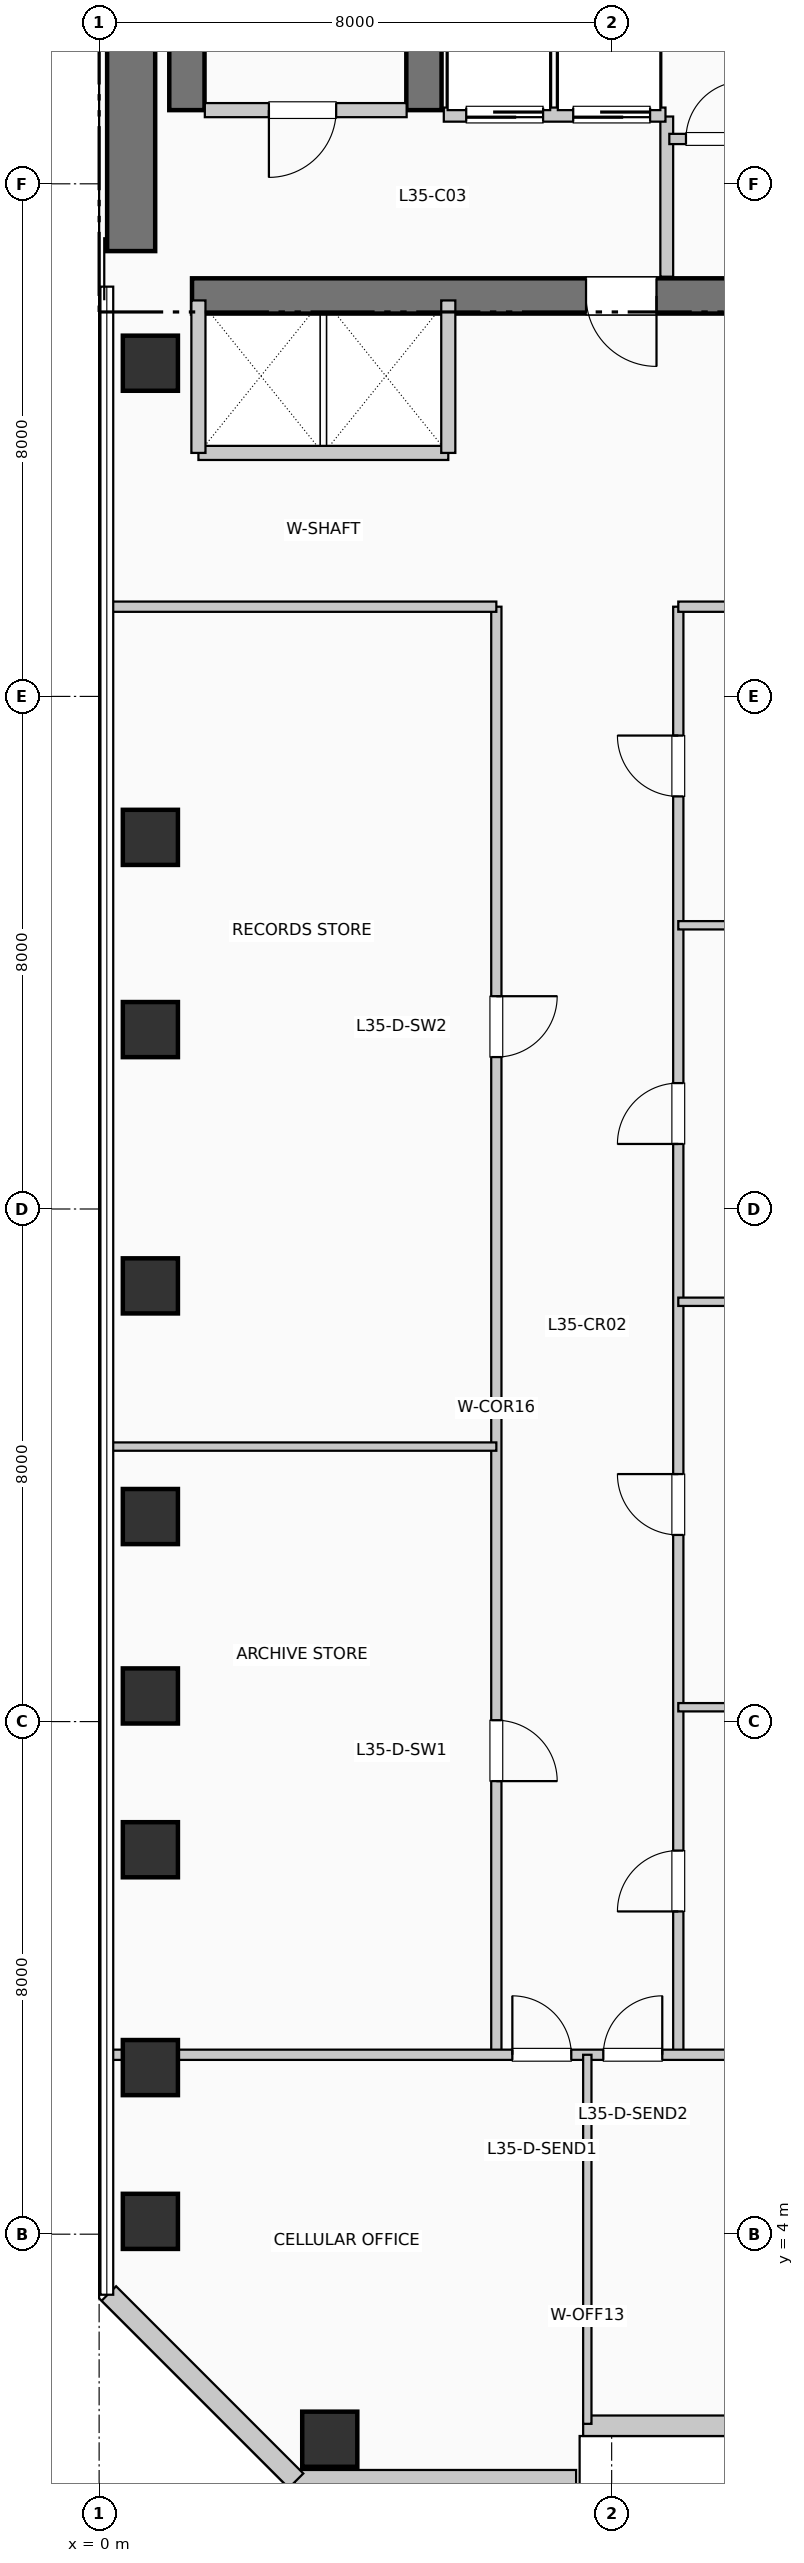
"""IFC4 building model, lengths in metres.
Left out: names, types, materials, properties, quantities, classifications, styles, units other than length and angle.
Written with IfcOpenShell. Run it as: python <this file> out.ifc"""

import sys

from ifc_helpers import new_model, si_unit, direction, frame, frame_2d, origin, origin_2d, place, context, subcontext, project, spatial, rectangle, extrude, element, fill, save


model = new_model("IFC4")
c1 = context("Model", 3, precision=1e-05, world=origin(), true_north=direction((0.0, 1.0)))
c2 = subcontext(c1, "Body", "Model", "MODEL_VIEW")
j1 = project(units=[si_unit("LENGTHUNIT", "METRE"), si_unit("PLANEANGLEUNIT", "RADIAN")], contexts=[c1])
p1 = place(None, origin())
s1 = spatial("IfcSite", under=j1, at=p1, CompositionType="ELEMENT")
p2 = place(p1, origin())
s2 = spatial("IfcBuilding", under=s1, at=p2, CompositionType="ELEMENT")
p3 = place(p2, frame((0.0, 0.0, 146.85)))
s3 = spatial("IfcBuildingStorey", under=s2, at=p3, CompositionType="ELEMENT", Elevation=146.85)
p4 = place(p3, frame((0.5, 34.95, 0.0), z_axis=(0.0, 0.0, 1.0), x_axis=(0.0, 1.0, 0.0)))
e1 = element("IfcWall", 1, at=p4, inside=s3, PredefinedType="SHEAR", context=c2, shape_type="SweptSolid", body=[
    extrude(rectangle(XDim=7.9, YDim=0.75, at=frame_2d((3.95, 0.0))), origin(), (0.0, 0.0, 1.0), 3.96),
])
p5 = place(p3, frame((1.45, 34.25, 0.0), z_axis=(0.0, 0.0, 1.0), x_axis=(1.0, 0.0, 0.0)))
e2 = element("IfcWall", 2, at=p5, inside=s3, PredefinedType="SHEAR", context=c2, shape_type="SweptSolid", body=[
    extrude(rectangle(XDim=10.71, YDim=0.55, at=frame_2d((5.355, 0.0))), origin(), (0.0, 0.0, 1.0), 3.96),
])
p6 = place(p5, frame((7.25, 0.0, 0.0), z_axis=(0.0, 0.0, 1.0), x_axis=(-1.0, 0.0, 0.0)))
e3 = element("IfcOpeningElement", 3, at=p6, cuts=e2, PredefinedType="OPENING", context=c2, shape_type="SweptSolid", body=[
    extrude(rectangle(XDim=1.1, YDim=2.15, at=frame_2d((0.55, 1.075))), frame((0.0, 0.285, 0.0), z_axis=(0.0, -1.0, 0.0), x_axis=(1.0, 0.0, 0.0)), (0.0, 0.0, 1.0), 0.57),
])
for number, where, z_axis, x_axis in (
    (4, (1.37, 37.15, 0.0), (0.0, 0.0, 1.0), (0.0, 1.0, 0.0)),
    (5, (5.07, 37.15, 0.0), (0.0, 0.0, 1.0), (0.0, 1.0, 0.0)),
):
    element("IfcWall", number, at=place(p3, frame(where, z_axis=z_axis, x_axis=x_axis)), inside=s3, PredefinedType="SHEAR", context=c2, shape_type="SweptSolid", body=[
        extrude(rectangle(XDim=7.89, YDim=0.55, at=frame_2d((3.945, 0.0))), origin(), (0.0, 0.0, 1.0), 3.96),
    ])
for number, where, z_axis, x_axis in (
    (6, (0.8, 4.2, 0.0), (0.0, 0.0, 1.0), (1.0, 0.0, 0.0)),
    (7, (0.8, 6.6, 0.0), (0.0, 0.0, 1.0), (1.0, 0.0, 0.0)),
    (8, (0.8, 10.0, 0.0), (0.0, 0.0, 1.0), (1.0, 0.0, 0.0)),
    (9, (0.8, 12.4, 0.0), (0.0, 0.0, 1.0), (1.0, 0.0, 0.0)),
    (10, (0.8, 15.2, 0.0), (0.0, 0.0, 1.0), (1.0, 0.0, 0.0)),
    (11, (0.8, 18.8, 0.0), (0.0, 0.0, 1.0), (1.0, 0.0, 0.0)),
    (12, (0.8, 22.8, 0.0), (0.0, 0.0, 1.0), (1.0, 0.0, 0.0)),
    (13, (0.8, 25.8, 0.0), (0.0, 0.0, 1.0), (1.0, 0.0, 0.0)),
    (14, (0.8, 33.2, 0.0), (0.0, 0.0, 1.0), (1.0, 0.0, 0.0)),
    (15, (3.6, 0.8, 0.0), (0.0, 0.0, 1.0), (1.0, 0.0, 0.0)),
):
    element("IfcColumn", number, at=place(p3, frame(where, z_axis=z_axis, x_axis=x_axis)), inside=s3, PredefinedType="COLUMN", context=c2, shape_type="SweptSolid", body=[
        extrude(rectangle(XDim=0.86, YDim=0.86, at=origin_2d()), origin(), (0.0, 0.0, 1.0), 3.96),
    ])
p7 = place(p3, frame((3.055, 0.16, 0.0), z_axis=(0.0, 0.0, 1.0), x_axis=(1.0, 0.0, 0.0)))
e16 = element("IfcWall", 16, at=p7, inside=s3, PredefinedType="SOLIDWALL", context=c2, shape_type="SweptSolid", body=[
    extrude(rectangle(XDim=4.39, YDim=0.32, at=frame_2d((2.195, 0.0))), origin(), (0.0, 0.0, 1.0), 3.71),
])
p8 = place(p3, frame((7.555, 1.01, 0.0), z_axis=(0.0, 0.0, 1.0), x_axis=(1.0, 0.0, 0.0)))
e17 = element("IfcWall", 17, at=p8, inside=s3, PredefinedType="SOLIDWALL", context=c2, shape_type="SweptSolid", body=[
    extrude(rectangle(XDim=8.89, YDim=0.32, at=frame_2d((4.445, 0.0))), origin(), (0.0, 0.0, 1.0), 3.71),
])
p9 = place(p8, frame((3.245, 0.0, 0.85)))
e18 = element("IfcOpeningElement", 18, at=p9, cuts=e17, PredefinedType="OPENING", context=c2, shape_type="SweptSolid", body=[
    extrude(rectangle(XDim=2.4, YDim=2.05, at=frame_2d((1.2, 1.025))), frame((0.0, 0.17, 0.0), z_axis=(0.0, -1.0, 0.0), x_axis=(1.0, 0.0, 0.0)), (0.0, 0.0, 1.0), 0.34),
])
p10 = place(p3, frame((0.152, 3.074, 0.0), z_axis=(0.0, 0.0, 1.0), x_axis=(0.707106781187, -0.707106781187, 0.0)))
e19 = element("IfcWall", 19, at=p10, inside=s3, PredefinedType="SOLIDWALL", context=c2, shape_type="SweptSolid", body=[
    extrude(rectangle(XDim=4.133, YDim=0.32, at=frame_2d((2.066, 0.0))), origin(), (0.0, 0.0, 1.0), 3.71),
])
p11 = place(p3, frame((1.65, 37.15, 0.0), z_axis=(0.0, 0.0, 1.0), x_axis=(1.0, 0.0, 0.0)))
e20 = element("IfcWall", 20, at=p11, inside=s3, PredefinedType="PARTITIONING", context=c2, shape_type="SweptSolid", body=[
    extrude(rectangle(XDim=3.15, YDim=0.22, at=frame_2d((1.575, 0.0))), origin(), (0.0, 0.0, 1.0), 3.71),
])
p12 = place(p11, frame((2.05, 0.0, 0.0), z_axis=(0.0, 0.0, 1.0), x_axis=(-1.0, 0.0, 0.0)))
e21 = element("IfcOpeningElement", 21, at=p12, cuts=e20, PredefinedType="OPENING", context=c2, shape_type="SweptSolid", body=[
    extrude(rectangle(XDim=1.05, YDim=2.15, at=frame_2d((0.525, 1.075))), frame((0.0, 0.12, 0.0), z_axis=(0.0, -1.0, 0.0), x_axis=(1.0, 0.0, 0.0)), (0.0, 0.0, 1.0), 0.24),
])
p13 = place(p3, frame((8.86, 34.55, 0.0), z_axis=(0.0, 0.0, 1.0), x_axis=(0.0, 1.0, 0.0)))
e22 = element("IfcWall", 22, at=p13, inside=s3, PredefinedType="PARTITIONING", context=c2, shape_type="SweptSolid", body=[
    extrude(rectangle(XDim=2.5, YDim=0.2, at=frame_2d((1.25, 0.0))), origin(), (0.0, 0.0, 1.0), 3.71),
])
p14 = place(p3, frame((5.38, 37.08, 0.0), z_axis=(0.0, 0.0, 1.0), x_axis=(1.0, 0.0, 0.0)))
e23 = element("IfcWall", 23, at=p14, inside=s3, PredefinedType="PARTITIONING", context=c2, shape_type="SweptSolid", body=[
    extrude(rectangle(XDim=3.46, YDim=0.22, at=frame_2d((1.73, 0.0))), origin(), (0.0, 0.0, 1.0), 3.71),
])
p15 = place(p14, frame((1.55, 0.0, 0.0), z_axis=(0.0, 0.0, 1.0), x_axis=(-1.0, 0.0, 0.0)))
e24 = element("IfcOpeningElement", 24, at=p15, cuts=e23, PredefinedType="OPENING", context=c2, shape_type="SweptSolid", body=[
    extrude(rectangle(XDim=1.2, YDim=2.2, at=frame_2d((0.6, 1.1))), frame((0.0, 0.12, 0.0), z_axis=(0.0, -1.0, 0.0), x_axis=(1.0, 0.0, 0.0)), (0.0, 0.0, 1.0), 0.24),
])
p16 = place(p14, frame((3.22, 0.0, 0.0), z_axis=(0.0, 0.0, 1.0), x_axis=(-1.0, 0.0, 0.0)))
e25 = element("IfcOpeningElement", 25, at=p16, cuts=e23, PredefinedType="OPENING", context=c2, shape_type="SweptSolid", body=[
    extrude(rectangle(XDim=1.2, YDim=2.2, at=frame_2d((0.6, 1.1))), frame((0.0, 0.12, 0.0), z_axis=(0.0, -1.0, 0.0), x_axis=(1.0, 0.0, 0.0)), (0.0, 0.0, 1.0), 0.24),
])
p17 = place(p3, frame((1.55, 31.8, 0.0), z_axis=(0.0, 0.0, 1.0), x_axis=(1.0, 0.0, 0.0)))
e26 = element("IfcWall", 26, at=p17, inside=s3, PredefinedType="PARTITIONING", context=c2, shape_type="SweptSolid", body=[
    extrude(rectangle(XDim=3.9, YDim=0.22, at=frame_2d((1.95, 0.0))), origin(), (0.0, 0.0, 1.0), 3.71),
])
for number, where, z_axis, x_axis in (
    (27, (1.55, 31.8, 0.0), (0.0, 0.0, 1.0), (0.0, 1.0, 0.0)),
    (28, (5.45, 31.8, 0.0), (0.0, 0.0, 1.0), (0.0, 1.0, 0.0)),
):
    element("IfcWall", number, at=place(p3, frame(where, z_axis=z_axis, x_axis=x_axis)), inside=s3, PredefinedType="PARTITIONING", context=c2, shape_type="SweptSolid", body=[
        extrude(rectangle(XDim=2.38, YDim=0.22, at=frame_2d((1.19, 0.0))), origin(), (0.0, 0.0, 1.0), 3.71),
    ])
p18 = place(p3, frame((8.9, 36.7, 0.0), z_axis=(0.0, 0.0, 1.0), x_axis=(1.0, 0.0, 0.0)))
e29 = element("IfcWall", 29, at=p18, inside=s3, PredefinedType="PARTITIONING", context=c2, shape_type="SweptSolid", body=[
    extrude(rectangle(XDim=3.25, YDim=0.16, at=frame_2d((1.625, 0.0))), origin(), (0.0, 0.0, 1.0), 3.71),
])
p19 = place(p18, frame((0.26, 0.0, 0.0)))
e30 = element("IfcOpeningElement", 30, at=p19, cuts=e29, PredefinedType="OPENING", context=c2, shape_type="SweptSolid", body=[
    extrude(rectangle(XDim=0.9, YDim=2.15, at=frame_2d((0.45, 1.075))), frame((0.0, 0.09, 0.0), z_axis=(0.0, -1.0, 0.0), x_axis=(1.0, 0.0, 0.0)), (0.0, 0.0, 1.0), 0.18),
])
p20 = place(p18, frame((1.68, 0.0, 0.0)))
e31 = element("IfcOpeningElement", 31, at=p20, cuts=e29, PredefinedType="OPENING", context=c2, shape_type="SweptSolid", body=[
    extrude(rectangle(XDim=0.9, YDim=2.15, at=frame_2d((0.45, 1.075))), frame((0.0, 0.09, 0.0), z_axis=(0.0, -1.0, 0.0), x_axis=(1.0, 0.0, 0.0)), (0.0, 0.0, 1.0), 0.18),
])
p21 = place(p3, frame((6.2, 6.8, 0.0), z_axis=(0.0, 0.0, 1.0), x_axis=(0.0, 1.0, 0.0)))
e32 = element("IfcWall", 32, at=p21, inside=s3, PredefinedType="PARTITIONING", context=c2, shape_type="SweptSolid", body=[
    extrude(rectangle(XDim=22.6, YDim=0.16, at=frame_2d((11.3, 0.0))), origin(), (0.0, 0.0, 1.0), 3.71),
])
p22 = place(p21, frame((5.221, 0.0, 0.0), z_axis=(0.0, 0.0, 1.0), x_axis=(-1.0, 0.0, 0.0)))
e33 = element("IfcOpeningElement", 33, at=p22, cuts=e32, PredefinedType="OPENING", context=c2, shape_type="SweptSolid", body=[
    extrude(rectangle(XDim=0.95, YDim=2.15, at=frame_2d((0.475, 1.075))), frame((0.0, 0.09, 0.0), z_axis=(0.0, -1.0, 0.0), x_axis=(1.0, 0.0, 0.0)), (0.0, 0.0, 1.0), 0.18),
])
p23 = place(p21, frame((16.521, 0.0, 0.0), z_axis=(0.0, 0.0, 1.0), x_axis=(-1.0, 0.0, 0.0)))
e34 = element("IfcOpeningElement", 34, at=p23, cuts=e32, PredefinedType="OPENING", context=c2, shape_type="SweptSolid", body=[
    extrude(rectangle(XDim=0.95, YDim=2.15, at=frame_2d((0.475, 1.075))), frame((0.0, 0.09, 0.0), z_axis=(0.0, -1.0, 0.0), x_axis=(1.0, 0.0, 0.0)), (0.0, 0.0, 1.0), 0.18),
])
p24 = place(p3, frame((9.04, 6.8, 0.0), z_axis=(0.0, 0.0, 1.0), x_axis=(0.0, 1.0, 0.0)))
e35 = element("IfcWall", 35, at=p24, inside=s3, PredefinedType="PARTITIONING", context=c2, shape_type="SweptSolid", body=[
    extrude(rectangle(XDim=22.6, YDim=0.16, at=frame_2d((11.3, 0.0))), origin(), (0.0, 0.0, 1.0), 3.71),
])
p25 = place(p24, frame((2.237, 0.0, 0.0)))
e36 = element("IfcOpeningElement", 36, at=p25, cuts=e35, PredefinedType="OPENING", context=c2, shape_type="SweptSolid", body=[
    extrude(rectangle(XDim=0.95, YDim=2.15, at=frame_2d((0.475, 1.075))), frame((0.0, 0.09, 0.0), z_axis=(0.0, -1.0, 0.0), x_axis=(1.0, 0.0, 0.0)), (0.0, 0.0, 1.0), 0.18),
])
p26 = place(p24, frame((8.113, 0.0, 0.0)))
e37 = element("IfcOpeningElement", 37, at=p26, cuts=e35, PredefinedType="OPENING", context=c2, shape_type="SweptSolid", body=[
    extrude(rectangle(XDim=0.95, YDim=2.15, at=frame_2d((0.475, 1.075))), frame((0.0, 0.09, 0.0), z_axis=(0.0, -1.0, 0.0), x_axis=(1.0, 0.0, 0.0)), (0.0, 0.0, 1.0), 0.18),
])
p27 = place(p24, frame((14.215, 0.0, 0.0)))
e38 = element("IfcOpeningElement", 38, at=p27, cuts=e35, PredefinedType="OPENING", context=c2, shape_type="SweptSolid", body=[
    extrude(rectangle(XDim=0.95, YDim=2.15, at=frame_2d((0.475, 1.075))), frame((0.0, 0.09, 0.0), z_axis=(0.0, -1.0, 0.0), x_axis=(1.0, 0.0, 0.0)), (0.0, 0.0, 1.0), 0.18),
])
p28 = place(p24, frame((19.639, 0.0, 0.0)))
e39 = element("IfcOpeningElement", 39, at=p28, cuts=e35, PredefinedType="OPENING", context=c2, shape_type="SweptSolid", body=[
    extrude(rectangle(XDim=0.95, YDim=2.15, at=frame_2d((0.475, 1.075))), frame((0.0, 0.09, 0.0), z_axis=(0.0, -1.0, 0.0), x_axis=(1.0, 0.0, 0.0)), (0.0, 0.0, 1.0), 0.18),
])
p29 = place(p3, frame((0.19, 6.8, 0.0), z_axis=(0.0, 0.0, 1.0), x_axis=(1.0, 0.0, 0.0)))
e40 = element("IfcWall", 40, at=p29, inside=s3, PredefinedType="PARTITIONING", context=c2, shape_type="SweptSolid", body=[
    extrude(rectangle(XDim=23.26, YDim=0.16, at=frame_2d((11.63, 0.0))), origin(), (0.0, 0.0, 1.0), 3.045),
])
p30 = place(p29, frame((6.26, 0.0, 0.0)))
e41 = element("IfcOpeningElement", 41, at=p30, cuts=e40, PredefinedType="OPENING", context=c2, shape_type="SweptSolid", body=[
    extrude(rectangle(XDim=0.92, YDim=2.1, at=frame_2d((0.46, 1.05))), frame((0.0, 0.09, 0.0), z_axis=(0.0, -1.0, 0.0), x_axis=(1.0, 0.0, 0.0)), (0.0, 0.0, 1.0), 0.18),
])
p31 = place(p29, frame((7.68, 0.0, 0.0)))
e42 = element("IfcOpeningElement", 42, at=p31, cuts=e40, PredefinedType="OPENING", context=c2, shape_type="SweptSolid", body=[
    extrude(rectangle(XDim=0.92, YDim=2.1, at=frame_2d((0.46, 1.05))), frame((0.0, 0.09, 0.0), z_axis=(0.0, -1.0, 0.0), x_axis=(1.0, 0.0, 0.0)), (0.0, 0.0, 1.0), 0.18),
])
p32 = place(p3, frame((0.19, 29.4, 0.0), z_axis=(0.0, 0.0, 1.0), x_axis=(1.0, 0.0, 0.0)))
e43 = element("IfcWall", 43, at=p32, inside=s3, PredefinedType="PARTITIONING", context=c2, shape_type="SweptSolid", body=[
    extrude(rectangle(XDim=6.01, YDim=0.16, at=frame_2d((3.005, 0.0))), origin(), (0.0, 0.0, 1.0), 3.365),
])
p33 = place(p3, frame((9.04, 29.4, 0.0), z_axis=(0.0, 0.0, 1.0), x_axis=(1.0, 0.0, 0.0)))
e44 = element("IfcWall", 44, at=p33, inside=s3, PredefinedType="PARTITIONING", context=c2, shape_type="SweptSolid", body=[
    extrude(rectangle(XDim=14.41, YDim=0.16, at=frame_2d((7.205, 0.0))), origin(), (0.0, 0.0, 1.0), 3.365),
])
p34 = place(p3, frame((7.62, 1.04, 0.0), z_axis=(0.0, 0.0, 1.0), x_axis=(0.0, 1.0, 0.0)))
e45 = element("IfcWall", 45, at=p34, inside=s3, PredefinedType="PARTITIONING", context=c2, shape_type="SweptSolid", body=[
    extrude(rectangle(XDim=5.76, YDim=0.13, at=frame_2d((2.88, 0.0))), origin(), (0.0, 0.0, 1.0), 3.71),
])
p35 = place(p3, frame((0.19, 16.292, 0.0), z_axis=(0.0, 0.0, 1.0), x_axis=(1.0, 0.0, 0.0)))
e46 = element("IfcWall", 46, at=p35, inside=s3, PredefinedType="PARTITIONING", context=c2, shape_type="SweptSolid", body=[
    extrude(rectangle(XDim=6.01, YDim=0.13, at=frame_2d((3.005, 0.0))), origin(), (0.0, 0.0, 1.0), 3.71),
])
for number, where, z_axis, x_axis in (
    (47, (9.04, 12.224, 0.0), (0.0, 0.0, 1.0), (1.0, 0.0, 0.0)),
    (48, (9.04, 18.552, 0.0), (0.0, 0.0, 1.0), (1.0, 0.0, 0.0)),
):
    element("IfcWall", number, at=place(p3, frame(where, z_axis=z_axis, x_axis=x_axis)), inside=s3, PredefinedType="PARTITIONING", context=c2, shape_type="SweptSolid", body=[
        extrude(rectangle(XDim=14.41, YDim=0.13, at=frame_2d((7.205, 0.0))), origin(), (0.0, 0.0, 1.0), 3.045),
    ])
p36 = place(p3, frame((9.04, 24.428, 0.0), z_axis=(0.0, 0.0, 1.0), x_axis=(1.0, 0.0, 0.0)))
e49 = element("IfcWall", 49, at=p36, inside=s3, PredefinedType="PARTITIONING", context=c2, shape_type="SweptSolid", body=[
    extrude(rectangle(XDim=14.41, YDim=0.13, at=frame_2d((7.205, 0.0))), origin(), (0.0, 0.0, 1.0), 3.71),
])
p37 = place(p12, origin())
e50 = element("IfcDoor", 50, at=p37, inside=s3, OperationType="SINGLE_SWING_LEFT", PredefinedType="DOOR", context=c2, shape_type="SweptSolid", body=[
    extrude(rectangle(XDim=1.05, YDim=2.15, at=frame_2d((0.525, 1.075))), frame((0.0, 0.025, 0.0), z_axis=(0.0, -1.0, 0.0), x_axis=(1.0, 0.0, 0.0)), (0.0, 0.0, 1.0), 0.05),
])
fill(e21, e50)
p38 = place(p6, origin())
e51 = element("IfcDoor", 51, at=p38, inside=s3, OperationType="SINGLE_SWING_RIGHT", PredefinedType="DOOR", context=c2, shape_type="SweptSolid", body=[
    extrude(rectangle(XDim=1.1, YDim=2.15, at=frame_2d((0.55, 1.075))), frame((0.0, 0.025, 0.0), z_axis=(0.0, -1.0, 0.0), x_axis=(1.0, 0.0, 0.0)), (0.0, 0.0, 1.0), 0.05),
])
fill(e3, e51)
p39 = place(p15, origin())
e52 = element("IfcDoor", 52, at=p39, inside=s3, OperationType="SLIDING_TO_RIGHT", PredefinedType="DOOR", context=c2, shape_type="SweptSolid", body=[
    extrude(rectangle(XDim=1.2, YDim=2.2, at=frame_2d((0.6, 1.1))), frame((0.0, 0.025, 0.0), z_axis=(0.0, -1.0, 0.0), x_axis=(1.0, 0.0, 0.0)), (0.0, 0.0, 1.0), 0.05),
])
fill(e24, e52)
p40 = place(p16, origin())
e53 = element("IfcDoor", 53, at=p40, inside=s3, OperationType="SLIDING_TO_RIGHT", PredefinedType="DOOR", context=c2, shape_type="SweptSolid", body=[
    extrude(rectangle(XDim=1.2, YDim=2.2, at=frame_2d((0.6, 1.1))), frame((0.0, 0.025, 0.0), z_axis=(0.0, -1.0, 0.0), x_axis=(1.0, 0.0, 0.0)), (0.0, 0.0, 1.0), 0.05),
])
fill(e25, e53)
p41 = place(p19, origin())
e54 = element("IfcDoor", 54, at=p41, inside=s3, OperationType="SINGLE_SWING_RIGHT", PredefinedType="DOOR", context=c2, shape_type="SweptSolid", body=[
    extrude(rectangle(XDim=0.9, YDim=2.15, at=frame_2d((0.45, 1.075))), frame((0.0, 0.025, 0.0), z_axis=(0.0, -1.0, 0.0), x_axis=(1.0, 0.0, 0.0)), (0.0, 0.0, 1.0), 0.05),
])
fill(e30, e54)
p42 = place(p30, origin())
e55 = element("IfcDoor", 55, at=p42, inside=s3, OperationType="SINGLE_SWING_LEFT", PredefinedType="DOOR", context=c2, shape_type="SweptSolid", body=[
    extrude(rectangle(XDim=0.92, YDim=2.1, at=frame_2d((0.46, 1.05))), frame((0.0, 0.025, 0.0), z_axis=(0.0, -1.0, 0.0), x_axis=(1.0, 0.0, 0.0)), (0.0, 0.0, 1.0), 0.05),
])
fill(e41, e55)
p43 = place(p31, origin())
e56 = element("IfcDoor", 56, at=p43, inside=s3, OperationType="SINGLE_SWING_RIGHT", PredefinedType="DOOR", context=c2, shape_type="SweptSolid", body=[
    extrude(rectangle(XDim=0.92, YDim=2.1, at=frame_2d((0.46, 1.05))), frame((0.0, 0.025, 0.0), z_axis=(0.0, -1.0, 0.0), x_axis=(1.0, 0.0, 0.0)), (0.0, 0.0, 1.0), 0.05),
])
fill(e42, e56)
p44 = place(p22, origin())
e57 = element("IfcDoor", 57, at=p44, inside=s3, OperationType="SINGLE_SWING_LEFT", PredefinedType="DOOR", context=c2, shape_type="SweptSolid", body=[
    extrude(rectangle(XDim=0.95, YDim=2.15, at=frame_2d((0.475, 1.075))), frame((0.0, 0.025, 0.0), z_axis=(0.0, -1.0, 0.0), x_axis=(1.0, 0.0, 0.0)), (0.0, 0.0, 1.0), 0.05),
])
fill(e33, e57)
p45 = place(p23, origin())
e58 = element("IfcDoor", 58, at=p45, inside=s3, OperationType="SINGLE_SWING_RIGHT", PredefinedType="DOOR", context=c2, shape_type="SweptSolid", body=[
    extrude(rectangle(XDim=0.95, YDim=2.15, at=frame_2d((0.475, 1.075))), frame((0.0, 0.025, 0.0), z_axis=(0.0, -1.0, 0.0), x_axis=(1.0, 0.0, 0.0)), (0.0, 0.0, 1.0), 0.05),
])
fill(e34, e58)
p46 = place(p25, origin())
e59 = element("IfcDoor", 59, at=p46, inside=s3, OperationType="SINGLE_SWING_LEFT", PredefinedType="DOOR", context=c2, shape_type="SweptSolid", body=[
    extrude(rectangle(XDim=0.95, YDim=2.15, at=frame_2d((0.475, 1.075))), frame((0.0, 0.025, 0.0), z_axis=(0.0, -1.0, 0.0), x_axis=(1.0, 0.0, 0.0)), (0.0, 0.0, 1.0), 0.05),
])
fill(e36, e59)
p47 = place(p26, origin())
e60 = element("IfcDoor", 60, at=p47, inside=s3, OperationType="SINGLE_SWING_RIGHT", PredefinedType="DOOR", context=c2, shape_type="SweptSolid", body=[
    extrude(rectangle(XDim=0.95, YDim=2.15, at=frame_2d((0.475, 1.075))), frame((0.0, 0.025, 0.0), z_axis=(0.0, -1.0, 0.0), x_axis=(1.0, 0.0, 0.0)), (0.0, 0.0, 1.0), 0.05),
])
fill(e37, e60)
p48 = place(p27, origin())
e61 = element("IfcDoor", 61, at=p48, inside=s3, OperationType="SINGLE_SWING_LEFT", PredefinedType="DOOR", context=c2, shape_type="SweptSolid", body=[
    extrude(rectangle(XDim=0.95, YDim=2.15, at=frame_2d((0.475, 1.075))), frame((0.0, 0.025, 0.0), z_axis=(0.0, -1.0, 0.0), x_axis=(1.0, 0.0, 0.0)), (0.0, 0.0, 1.0), 0.05),
])
fill(e38, e61)
p49 = place(p28, origin())
e62 = element("IfcDoor", 62, at=p49, inside=s3, OperationType="SINGLE_SWING_RIGHT", PredefinedType="DOOR", context=c2, shape_type="SweptSolid", body=[
    extrude(rectangle(XDim=0.95, YDim=2.15, at=frame_2d((0.475, 1.075))), frame((0.0, 0.025, 0.0), z_axis=(0.0, -1.0, 0.0), x_axis=(1.0, 0.0, 0.0)), (0.0, 0.0, 1.0), 0.05),
])
fill(e39, e62)
save(model, sys.argv[1])
